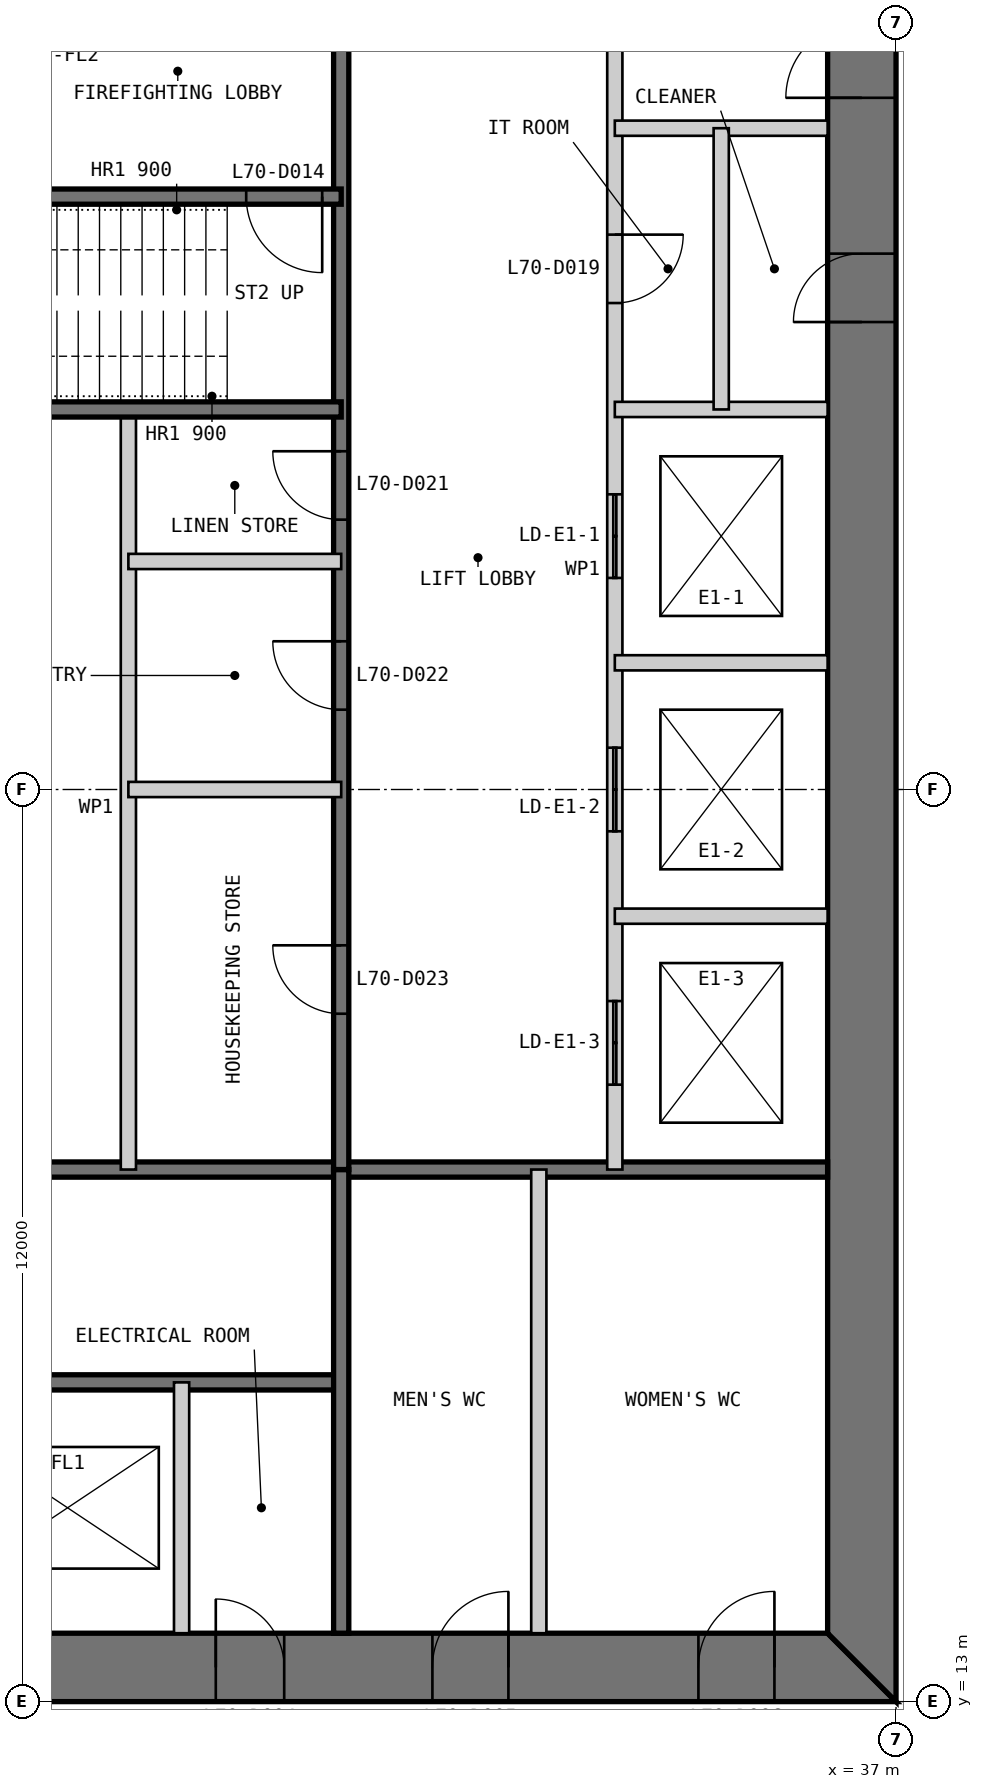
"""IFC4 building model, lengths in metres.
Left out: names, types, materials, properties, quantities, classifications, styles, units other than length and angle.
Written with IfcOpenShell. Run it as: python <this file> out.ifc"""

import sys

from ifc_helpers import new_model, si_unit, direction, frame, frame_2d, origin, place, context, subcontext, project, spatial, polyline, rectangle, outline, extrude, element, fill, save


model = new_model("IFC4")
c1 = context("Model", 3, precision=1e-05, world=origin(), true_north=direction((0.0, 1.0)))
c2 = subcontext(c1, "Body", "Model", "MODEL_VIEW")
j1 = project(units=[si_unit("LENGTHUNIT", "METRE"), si_unit("PLANEANGLEUNIT", "RADIAN")], contexts=[c1])
p1 = place(None, origin())
s1 = spatial("IfcSite", under=j1, at=p1, CompositionType="ELEMENT")
p2 = place(p1, origin())
s2 = spatial("IfcBuilding", under=s1, at=p2, CompositionType="ELEMENT")
p3 = place(p2, frame((0.0, 0.0, 290.0)))
s3 = spatial("IfcBuildingStorey", under=s2, at=p3, CompositionType="ELEMENT", Elevation=290.0)
p4 = place(p3, frame((13.0, 13.45, 0.0), z_axis=(0.0, 0.0, 1.0), x_axis=(1.0, 0.0, 0.0)))
e1 = element("IfcWall", 1, at=p4, inside=s3, PredefinedType="SHEAR", context=c2, shape_type="SweptSolid", body=[
    extrude(outline(polyline([(0.0, -0.45), (24.0, -0.45), (23.1, 0.45), (0.9, 0.45), (0.0, -0.45)])), origin(), (0.0, 0.0, 1.0), 3.4),
])
p5 = place(p4, frame((4.9, 0.0, 0.0)))
e2 = element("IfcOpeningElement", 2, at=p5, cuts=e1, PredefinedType="OPENING", context=c2, shape_type="SweptSolid", body=[
    extrude(rectangle(XDim=1.0, YDim=2.2, at=frame_2d((0.5, 1.1))), frame((0.0, 0.46, 0.0), z_axis=(0.0, -1.0, 0.0), x_axis=(1.0, 0.0, 0.0)), (0.0, 0.0, 1.0), 0.92),
])
p6 = place(p4, frame((8.9, 0.0, 0.0)))
e3 = element("IfcOpeningElement", 3, at=p6, cuts=e1, PredefinedType="OPENING", context=c2, shape_type="SweptSolid", body=[
    extrude(rectangle(XDim=1.1, YDim=2.2, at=frame_2d((0.55, 1.1))), frame((0.0, 0.46, 0.0), z_axis=(0.0, -1.0, 0.0), x_axis=(1.0, 0.0, 0.0)), (0.0, 0.0, 1.0), 0.92),
])
p7 = place(p4, frame((15.05, 0.0, 0.0)))
e4 = element("IfcOpeningElement", 4, at=p7, cuts=e1, PredefinedType="OPENING", context=c2, shape_type="SweptSolid", body=[
    extrude(rectangle(XDim=0.9, YDim=2.2, at=frame_2d((0.45, 1.1))), frame((0.0, 0.46, 0.0), z_axis=(0.0, -1.0, 0.0), x_axis=(1.0, 0.0, 0.0)), (0.0, 0.0, 1.0), 0.92),
])
p8 = place(p4, frame((17.9, 0.0, 0.0)))
e5 = element("IfcOpeningElement", 5, at=p8, cuts=e1, PredefinedType="OPENING", context=c2, shape_type="SweptSolid", body=[
    extrude(rectangle(XDim=1.0, YDim=2.2, at=frame_2d((0.5, 1.1))), frame((0.0, 0.46, 0.0), z_axis=(0.0, -1.0, 0.0), x_axis=(1.0, 0.0, 0.0)), (0.0, 0.0, 1.0), 0.92),
])
p9 = place(p4, frame((21.4, 0.0, 0.0)))
e6 = element("IfcOpeningElement", 6, at=p9, cuts=e1, PredefinedType="OPENING", context=c2, shape_type="SweptSolid", body=[
    extrude(rectangle(XDim=1.0, YDim=2.2, at=frame_2d((0.5, 1.1))), frame((0.0, 0.46, 0.0), z_axis=(0.0, -1.0, 0.0), x_axis=(1.0, 0.0, 0.0)), (0.0, 0.0, 1.0), 0.92),
])
p10 = place(p3, frame((36.55, 13.9, 0.0), z_axis=(0.0, 0.0, 1.0), x_axis=(0.0, 1.0, 0.0)))
e7 = element("IfcWall", 7, at=p10, inside=s3, PredefinedType="SHEAR", context=c2, shape_type="SweptSolid", body=[
    extrude(outline(polyline([(-0.9, -0.45), (23.1, -0.45), (22.2, 0.45), (0.0, 0.45), (-0.9, -0.45)])), origin(), (0.0, 0.0, 1.0), 3.4),
])
p11 = place(p10, frame((20.2, 0.0, 0.0)))
e8 = element("IfcOpeningElement", 8, at=p11, cuts=e7, PredefinedType="OPENING", context=c2, shape_type="SweptSolid", body=[
    extrude(rectangle(XDim=1.0, YDim=2.2, at=frame_2d((0.5, 1.1))), frame((0.0, 0.46, 0.0), z_axis=(0.0, -1.0, 0.0), x_axis=(1.0, 0.0, 0.0)), (0.0, 0.0, 1.0), 0.92),
])
p12 = place(p10, frame((17.25, 0.0, 0.0)))
e9 = element("IfcOpeningElement", 9, at=p12, cuts=e7, PredefinedType="OPENING", context=c2, shape_type="SweptSolid", body=[
    extrude(rectangle(XDim=0.9, YDim=2.2, at=frame_2d((0.45, 1.1))), frame((0.0, 0.46, 0.0), z_axis=(0.0, -1.0, 0.0), x_axis=(1.0, 0.0, 0.0)), (0.0, 0.0, 1.0), 0.92),
])
p13 = place(p3, frame((20.3, 17.2, 0.0), z_axis=(0.0, 0.0, 1.0), x_axis=(1.0, 0.0, 0.0)))
e10 = element("IfcWall", 10, at=p13, inside=s3, PredefinedType="SOLIDWALL", context=c2, shape_type="SweptSolid", body=[
    extrude(rectangle(XDim=9.4, YDim=0.2, at=frame_2d((4.7, 0.0))), origin(), (0.0, 0.0, 1.0), 3.2),
])
p14 = place(p13, frame((0.25, 0.0, 0.0)))
e11 = element("IfcOpeningElement", 11, at=p14, cuts=e10, PredefinedType="OPENING", context=c2, shape_type="SweptSolid", body=[
    extrude(rectangle(XDim=1.0, YDim=2.2, at=frame_2d((0.5, 1.1))), frame((0.0, 0.11, 0.0), z_axis=(0.0, -1.0, 0.0), x_axis=(1.0, 0.0, 0.0)), (0.0, 0.0, 1.0), 0.22),
])
p15 = place(p3, frame((20.3, 20.0, 0.0), z_axis=(0.0, 0.0, 1.0), x_axis=(1.0, 0.0, 0.0)))
e12 = element("IfcWall", 12, at=p15, inside=s3, PredefinedType="SOLIDWALL", context=c2, shape_type="SweptSolid", body=[
    extrude(rectangle(XDim=15.8, YDim=0.2, at=frame_2d((7.9, 0.0))), origin(), (0.0, 0.0, 1.0), 3.2),
])
p16 = place(p3, frame((27.6, 13.9, 0.0), z_axis=(0.0, 0.0, 1.0), x_axis=(0.0, 1.0, 0.0)))
e13 = element("IfcWall", 13, at=p16, inside=s3, PredefinedType="PARTITIONING", context=c2, shape_type="SweptSolid", body=[
    extrude(rectangle(XDim=3.3, YDim=0.2, at=frame_2d((1.65, 0.0))), origin(), (0.0, 0.0, 1.0), 3.2),
])
p17 = place(p3, frame((29.7, 13.9, 0.0), z_axis=(0.0, 0.0, 1.0), x_axis=(0.0, 1.0, 0.0)))
e14 = element("IfcWall", 14, at=p17, inside=s3, PredefinedType="SOLIDWALL", context=c2, shape_type="SweptSolid", body=[
    extrude(rectangle(XDim=6.1, YDim=0.2, at=frame_2d((3.05, 0.0))), origin(), (0.0, 0.0, 1.0), 3.2),
])
p18 = place(p3, frame((32.3, 13.9, 0.0), z_axis=(0.0, 0.0, 1.0), x_axis=(0.0, 1.0, 0.0)))
e15 = element("IfcWall", 15, at=p18, inside=s3, PredefinedType="PARTITIONING", context=c2, shape_type="SweptSolid", body=[
    extrude(rectangle(XDim=6.1, YDim=0.2, at=frame_2d((3.05, 0.0))), origin(), (0.0, 0.0, 1.0), 3.2),
])
p19 = place(p3, frame((33.3, 36.1, 0.0), z_axis=(0.0, 0.0, 1.0), x_axis=(0.0, -1.0, 0.0)))
e16 = element("IfcWall", 16, at=p19, inside=s3, PredefinedType="PARTITIONING", context=c2, shape_type="SweptSolid", body=[
    extrude(rectangle(XDim=16.1, YDim=0.2, at=frame_2d((8.05, 0.0))), origin(), (0.0, 0.0, 1.0), 3.2),
])
p20 = place(p19, frame((3.8, 0.0, 0.0)))
e17 = element("IfcOpeningElement", 17, at=p20, cuts=e16, PredefinedType="OPENING", context=c2, shape_type="SweptSolid", body=[
    extrude(rectangle(XDim=0.9, YDim=2.2, at=frame_2d((0.45, 1.1))), frame((0.0, 0.11, 0.0), z_axis=(0.0, -1.0, 0.0), x_axis=(1.0, 0.0, 0.0)), (0.0, 0.0, 1.0), 0.22),
])
p21 = place(p19, frame((7.217, 0.0, 0.0)))
e18 = element("IfcOpeningElement", 18, at=p21, cuts=e16, PredefinedType="OPENING", context=c2, shape_type="SweptSolid", body=[
    extrude(rectangle(XDim=1.1, YDim=2.2, at=frame_2d((0.55, 1.1))), frame((0.0, 0.11, 0.0), z_axis=(0.0, -1.0, 0.0), x_axis=(1.0, 0.0, 0.0)), (0.0, 0.0, 1.0), 0.22),
])
p22 = place(p19, frame((10.55, 0.0, 0.0)))
e19 = element("IfcOpeningElement", 19, at=p22, cuts=e16, PredefinedType="OPENING", context=c2, shape_type="SweptSolid", body=[
    extrude(rectangle(XDim=1.1, YDim=2.2, at=frame_2d((0.55, 1.1))), frame((0.0, 0.11, 0.0), z_axis=(0.0, -1.0, 0.0), x_axis=(1.0, 0.0, 0.0)), (0.0, 0.0, 1.0), 0.22),
])
p23 = place(p19, frame((13.883, 0.0, 0.0)))
e20 = element("IfcOpeningElement", 20, at=p23, cuts=e16, PredefinedType="OPENING", context=c2, shape_type="SweptSolid", body=[
    extrude(rectangle(XDim=1.1, YDim=2.2, at=frame_2d((0.55, 1.1))), frame((0.0, 0.11, 0.0), z_axis=(0.0, -1.0, 0.0), x_axis=(1.0, 0.0, 0.0)), (0.0, 0.0, 1.0), 0.22),
])
p24 = place(p3, frame((29.7, 36.1, 0.0), z_axis=(0.0, 0.0, 1.0), x_axis=(0.0, -1.0, 0.0)))
e21 = element("IfcWall", 21, at=p24, inside=s3, PredefinedType="SOLIDWALL", context=c2, shape_type="SweptSolid", body=[
    extrude(rectangle(XDim=16.1, YDim=0.2, at=frame_2d((8.05, 0.0))), origin(), (0.0, 0.0, 1.0), 3.2),
])
p25 = place(p24, frame((6.65, 0.0, 0.0)))
e22 = element("IfcOpeningElement", 22, at=p25, cuts=e21, PredefinedType="OPENING", context=c2, shape_type="SweptSolid", body=[
    extrude(rectangle(XDim=0.9, YDim=2.2, at=frame_2d((0.45, 1.1))), frame((0.0, 0.11, 0.0), z_axis=(0.0, -1.0, 0.0), x_axis=(1.0, 0.0, 0.0)), (0.0, 0.0, 1.0), 0.22),
])
p26 = place(p24, frame((9.15, 0.0, 0.0)))
e23 = element("IfcOpeningElement", 23, at=p26, cuts=e21, PredefinedType="OPENING", context=c2, shape_type="SweptSolid", body=[
    extrude(rectangle(XDim=0.9, YDim=2.2, at=frame_2d((0.45, 1.1))), frame((0.0, 0.11, 0.0), z_axis=(0.0, -1.0, 0.0), x_axis=(1.0, 0.0, 0.0)), (0.0, 0.0, 1.0), 0.22),
])
p27 = place(p24, frame((13.15, 0.0, 0.0)))
e24 = element("IfcOpeningElement", 24, at=p27, cuts=e21, PredefinedType="OPENING", context=c2, shape_type="SweptSolid", body=[
    extrude(rectangle(XDim=0.9, YDim=2.2, at=frame_2d((0.45, 1.1))), frame((0.0, 0.11, 0.0), z_axis=(0.0, -1.0, 0.0), x_axis=(1.0, 0.0, 0.0)), (0.0, 0.0, 1.0), 0.22),
])
for number, where, z_axis, x_axis in (
    (25, (36.1, 30.0, 0.0), (0.0, 0.0, 1.0), (-1.0, 0.0, 0.0)),
    (26, (36.1, 26.667, 0.0), (0.0, 0.0, 1.0), (-1.0, 0.0, 0.0)),
    (27, (36.1, 23.333, 0.0), (0.0, 0.0, 1.0), (-1.0, 0.0, 0.0)),
):
    element("IfcWall", number, at=place(p3, frame(where, z_axis=z_axis, x_axis=x_axis)), inside=s3, PredefinedType="PARTITIONING", context=c2, shape_type="SweptSolid", body=[
        extrude(rectangle(XDim=2.8, YDim=0.2, at=frame_2d((1.4, 0.0))), origin(), (0.0, 0.0, 1.0), 3.2),
    ])
p28 = place(p3, frame((26.9, 30.0, 0.0), z_axis=(0.0, 0.0, 1.0), x_axis=(0.0, -1.0, 0.0)))
e28 = element("IfcWall", 28, at=p28, inside=s3, PredefinedType="PARTITIONING", context=c2, shape_type="SweptSolid", body=[
    extrude(rectangle(XDim=10.0, YDim=0.2, at=frame_2d((5.0, 0.0))), origin(), (0.0, 0.0, 1.0), 3.2),
])
p29 = place(p3, frame((29.7, 32.8, 0.0), z_axis=(0.0, 0.0, 1.0), x_axis=(-1.0, 0.0, 0.0)))
e29 = element("IfcWall", 29, at=p29, inside=s3, PredefinedType="SOLIDWALL", context=c2, shape_type="SweptSolid", body=[
    extrude(rectangle(XDim=9.4, YDim=0.2, at=frame_2d((4.7, 0.0))), origin(), (0.0, 0.0, 1.0), 3.2),
])
p30 = place(p29, frame((0.25, 0.0, 0.0)))
e30 = element("IfcOpeningElement", 30, at=p30, cuts=e29, PredefinedType="OPENING", context=c2, shape_type="SweptSolid", body=[
    extrude(rectangle(XDim=1.0, YDim=2.2, at=frame_2d((0.5, 1.1))), frame((0.0, 0.11, 0.0), z_axis=(0.0, -1.0, 0.0), x_axis=(1.0, 0.0, 0.0)), (0.0, 0.0, 1.0), 0.22),
])
p31 = place(p3, frame((29.7, 30.0, 0.0), z_axis=(0.0, 0.0, 1.0), x_axis=(-1.0, 0.0, 0.0)))
e31 = element("IfcWall", 31, at=p31, inside=s3, PredefinedType="SOLIDWALL", context=c2, shape_type="SweptSolid", body=[
    extrude(rectangle(XDim=15.8, YDim=0.2, at=frame_2d((7.9, 0.0))), origin(), (0.0, 0.0, 1.0), 3.2),
])
p32 = place(p3, frame((36.1, 33.7, 0.0), z_axis=(0.0, 0.0, 1.0), x_axis=(-1.0, 0.0, 0.0)))
e32 = element("IfcWall", 32, at=p32, inside=s3, PredefinedType="PARTITIONING", context=c2, shape_type="SweptSolid", body=[
    extrude(rectangle(XDim=2.8, YDim=0.2, at=frame_2d((1.4, 0.0))), origin(), (0.0, 0.0, 1.0), 3.2),
])
p33 = place(p3, frame((34.7, 33.7, 0.0), z_axis=(0.0, 0.0, 1.0), x_axis=(0.0, -1.0, 0.0)))
e33 = element("IfcWall", 33, at=p33, inside=s3, PredefinedType="PARTITIONING", context=c2, shape_type="SweptSolid", body=[
    extrude(rectangle(XDim=3.7, YDim=0.2, at=frame_2d((1.85, 0.0))), origin(), (0.0, 0.0, 1.0), 3.2),
])
for number, where, z_axis, x_axis in (
    (34, (29.7, 28.0, 0.0), (0.0, 0.0, 1.0), (-1.0, 0.0, 0.0)),
    (35, (29.7, 25.0, 0.0), (0.0, 0.0, 1.0), (-1.0, 0.0, 0.0)),
):
    element("IfcWall", number, at=place(p3, frame(where, z_axis=z_axis, x_axis=x_axis)), inside=s3, PredefinedType="PARTITIONING", context=c2, shape_type="SweptSolid", body=[
        extrude(rectangle(XDim=2.8, YDim=0.2, at=frame_2d((1.4, 0.0))), origin(), (0.0, 0.0, 1.0), 3.2),
    ])
p34 = place(p7, origin())
e36 = element("IfcDoor", 36, at=p34, inside=s3, OperationType="SINGLE_SWING_LEFT", PredefinedType="DOOR", context=c2, shape_type="SweptSolid", body=[
    extrude(rectangle(XDim=0.9, YDim=2.2, at=frame_2d((0.45, 1.1))), frame((0.0, 0.025, 0.0), z_axis=(0.0, -1.0, 0.0), x_axis=(1.0, 0.0, 0.0)), (0.0, 0.0, 1.0), 0.05),
    extrude(outline(polyline([(0.0, 0.0), (0.04, 0.0), (0.04, 2.16), (0.86, 2.16), (0.86, 0.0), (0.9, 0.0), (0.9, 2.2), (0.0, 2.2), (0.0, 0.0)])), frame((0.0, 0.3, 0.0), z_axis=(0.0, -1.0, 0.0), x_axis=(1.0, 0.0, 0.0)), (0.0, 0.0, 1.0), 0.6),
])
fill(e4, e36)
p35 = place(p8, origin())
e37 = element("IfcDoor", 37, at=p35, inside=s3, OperationType="SINGLE_SWING_RIGHT", PredefinedType="DOOR", context=c2, shape_type="SweptSolid", body=[
    extrude(rectangle(XDim=1.0, YDim=2.2, at=frame_2d((0.5, 1.1))), frame((0.0, 0.025, 0.0), z_axis=(0.0, -1.0, 0.0), x_axis=(1.0, 0.0, 0.0)), (0.0, 0.0, 1.0), 0.05),
    extrude(outline(polyline([(0.0, 0.0), (0.04, 0.0), (0.04, 2.16), (0.96, 2.16), (0.96, 0.0), (1.0, 0.0), (1.0, 2.2), (0.0, 2.2), (0.0, 0.0)])), frame((0.0, 0.3, 0.0), z_axis=(0.0, -1.0, 0.0), x_axis=(1.0, 0.0, 0.0)), (0.0, 0.0, 1.0), 0.6),
])
fill(e5, e37)
p36 = place(p9, origin())
e38 = element("IfcDoor", 38, at=p36, inside=s3, OperationType="SINGLE_SWING_RIGHT", PredefinedType="DOOR", context=c2, shape_type="SweptSolid", body=[
    extrude(rectangle(XDim=1.0, YDim=2.2, at=frame_2d((0.5, 1.1))), frame((0.0, 0.025, 0.0), z_axis=(0.0, -1.0, 0.0), x_axis=(1.0, 0.0, 0.0)), (0.0, 0.0, 1.0), 0.05),
    extrude(outline(polyline([(0.0, 0.0), (0.04, 0.0), (0.04, 2.16), (0.96, 2.16), (0.96, 0.0), (1.0, 0.0), (1.0, 2.2), (0.0, 2.2), (0.0, 0.0)])), frame((0.0, 0.3, 0.0), z_axis=(0.0, -1.0, 0.0), x_axis=(1.0, 0.0, 0.0)), (0.0, 0.0, 1.0), 0.6),
])
fill(e6, e38)
p37 = place(p30, origin())
e39 = element("IfcDoor", 39, at=p37, inside=s3, OperationType="SINGLE_SWING_LEFT", PredefinedType="DOOR", context=c2, shape_type="SweptSolid", body=[
    extrude(rectangle(XDim=1.0, YDim=2.2, at=frame_2d((0.5, 1.1))), frame((0.0, 0.025, 0.0), z_axis=(0.0, -1.0, 0.0), x_axis=(1.0, 0.0, 0.0)), (0.0, 0.0, 1.0), 0.05),
])
fill(e30, e39)
p38 = place(p11, origin())
e40 = element("IfcDoor", 40, at=p38, inside=s3, OperationType="SINGLE_SWING_LEFT", PredefinedType="DOOR", context=c2, shape_type="SweptSolid", body=[
    extrude(rectangle(XDim=1.0, YDim=2.2, at=frame_2d((0.5, 1.1))), frame((0.0, 0.025, 0.0), z_axis=(0.0, -1.0, 0.0), x_axis=(1.0, 0.0, 0.0)), (0.0, 0.0, 1.0), 0.05),
    extrude(outline(polyline([(0.0, 0.0), (0.04, 0.0), (0.04, 2.16), (0.96, 2.16), (0.96, 0.0), (1.0, 0.0), (1.0, 2.2), (0.0, 2.2), (0.0, 0.0)])), frame((0.0, 0.3, 0.0), z_axis=(0.0, -1.0, 0.0), x_axis=(1.0, 0.0, 0.0)), (0.0, 0.0, 1.0), 0.6),
])
fill(e8, e40)
p39 = place(p20, origin())
e41 = element("IfcDoor", 41, at=p39, inside=s3, OperationType="SINGLE_SWING_LEFT", PredefinedType="DOOR", context=c2, shape_type="SweptSolid", body=[
    extrude(rectangle(XDim=0.9, YDim=2.2, at=frame_2d((0.45, 1.1))), frame((0.0, 0.025, 0.0), z_axis=(0.0, -1.0, 0.0), x_axis=(1.0, 0.0, 0.0)), (0.0, 0.0, 1.0), 0.05),
])
fill(e17, e41)
p40 = place(p12, origin())
e42 = element("IfcDoor", 42, at=p40, inside=s3, OperationType="SINGLE_SWING_LEFT", PredefinedType="DOOR", context=c2, shape_type="SweptSolid", body=[
    extrude(rectangle(XDim=0.9, YDim=2.2, at=frame_2d((0.45, 1.1))), frame((0.0, 0.025, 0.0), z_axis=(0.0, -1.0, 0.0), x_axis=(1.0, 0.0, 0.0)), (0.0, 0.0, 1.0), 0.05),
    extrude(outline(polyline([(0.0, 0.0), (0.04, 0.0), (0.04, 2.16), (0.86, 2.16), (0.86, 0.0), (0.9, 0.0), (0.9, 2.2), (0.0, 2.2), (0.0, 0.0)])), frame((0.0, 0.3, 0.0), z_axis=(0.0, -1.0, 0.0), x_axis=(1.0, 0.0, 0.0)), (0.0, 0.0, 1.0), 0.6),
])
fill(e9, e42)
p41 = place(p25, frame((0.9, 0.0, 0.0), z_axis=(0.0, 0.0, 1.0), x_axis=(-1.0, 0.0, 0.0)))
e43 = element("IfcDoor", 43, at=p41, inside=s3, OperationType="SINGLE_SWING_RIGHT", PredefinedType="DOOR", context=c2, shape_type="SweptSolid", body=[
    extrude(rectangle(XDim=0.9, YDim=2.2, at=frame_2d((0.45, 1.1))), frame((0.0, 0.025, 0.0), z_axis=(0.0, -1.0, 0.0), x_axis=(1.0, 0.0, 0.0)), (0.0, 0.0, 1.0), 0.05),
])
fill(e22, e43)
p42 = place(p26, frame((0.9, 0.0, 0.0), z_axis=(0.0, 0.0, 1.0), x_axis=(-1.0, 0.0, 0.0)))
e44 = element("IfcDoor", 44, at=p42, inside=s3, OperationType="SINGLE_SWING_RIGHT", PredefinedType="DOOR", context=c2, shape_type="SweptSolid", body=[
    extrude(rectangle(XDim=0.9, YDim=2.2, at=frame_2d((0.45, 1.1))), frame((0.0, 0.025, 0.0), z_axis=(0.0, -1.0, 0.0), x_axis=(1.0, 0.0, 0.0)), (0.0, 0.0, 1.0), 0.05),
])
fill(e23, e44)
p43 = place(p27, frame((0.9, 0.0, 0.0), z_axis=(0.0, 0.0, 1.0), x_axis=(-1.0, 0.0, 0.0)))
e45 = element("IfcDoor", 45, at=p43, inside=s3, OperationType="SINGLE_SWING_RIGHT", PredefinedType="DOOR", context=c2, shape_type="SweptSolid", body=[
    extrude(rectangle(XDim=0.9, YDim=2.2, at=frame_2d((0.45, 1.1))), frame((0.0, 0.025, 0.0), z_axis=(0.0, -1.0, 0.0), x_axis=(1.0, 0.0, 0.0)), (0.0, 0.0, 1.0), 0.05),
])
fill(e24, e45)
p44 = place(p21, origin())
e46 = element("IfcDoor", 46, at=p44, inside=s3, OperationType="DOUBLE_DOOR_SLIDING", PredefinedType="DOOR", context=c2, shape_type="SweptSolid", body=[
    extrude(rectangle(XDim=1.1, YDim=2.2, at=frame_2d((0.55, 1.1))), frame((0.0, 0.025, 0.0), z_axis=(0.0, -1.0, 0.0), x_axis=(1.0, 0.0, 0.0)), (0.0, 0.0, 1.0), 0.05),
])
fill(e18, e46)
p45 = place(p22, origin())
e47 = element("IfcDoor", 47, at=p45, inside=s3, OperationType="DOUBLE_DOOR_SLIDING", PredefinedType="DOOR", context=c2, shape_type="SweptSolid", body=[
    extrude(rectangle(XDim=1.1, YDim=2.2, at=frame_2d((0.55, 1.1))), frame((0.0, 0.025, 0.0), z_axis=(0.0, -1.0, 0.0), x_axis=(1.0, 0.0, 0.0)), (0.0, 0.0, 1.0), 0.05),
])
fill(e19, e47)
p46 = place(p23, origin())
e48 = element("IfcDoor", 48, at=p46, inside=s3, OperationType="DOUBLE_DOOR_SLIDING", PredefinedType="DOOR", context=c2, shape_type="SweptSolid", body=[
    extrude(rectangle(XDim=1.1, YDim=2.2, at=frame_2d((0.55, 1.1))), frame((0.0, 0.025, 0.0), z_axis=(0.0, -1.0, 0.0), x_axis=(1.0, 0.0, 0.0)), (0.0, 0.0, 1.0), 0.05),
])
fill(e20, e48)
save(model, sys.argv[1])
